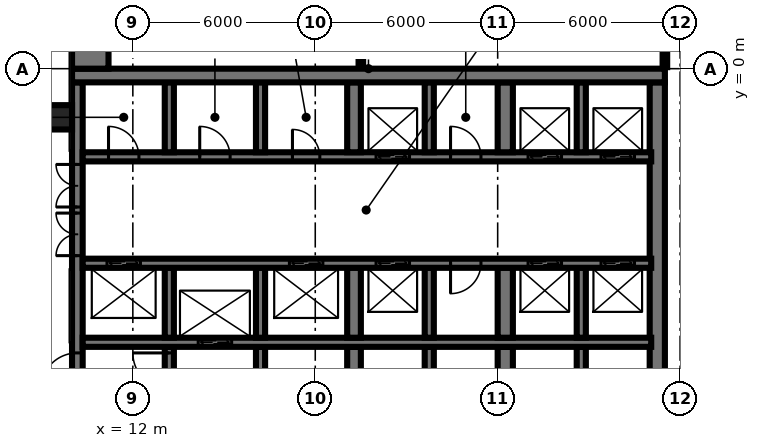
"""IFC4 building model, lengths in metres.
Left out: names, types, materials, properties, quantities, classifications, styles, units other than length and angle.
Written with IfcOpenShell. Run it as: python <this file> out.ifc"""

import sys

from ifc_helpers import new_model, si_unit, direction, frame, frame_2d, origin, origin_2d, place, context, subcontext, project, spatial, rectangle, extrude, element, fill, save


model = new_model("IFC4")
c1 = context("Model", 3, precision=1e-05, world=origin(), true_north=direction((0.0, 1.0)))
c2 = subcontext(c1, "Body", "Model", "MODEL_VIEW")
j1 = project(units=[si_unit("LENGTHUNIT", "METRE"), si_unit("PLANEANGLEUNIT", "RADIAN")], contexts=[c1])
p1 = place(None, origin())
s1 = spatial("IfcSite", under=j1, at=p1, CompositionType="ELEMENT")
p2 = place(p1, origin())
s2 = spatial("IfcBuilding", under=s1, at=p2, CompositionType="ELEMENT")
p3 = place(p2, origin())
s3 = spatial("IfcBuildingStorey", under=s2, at=p3, CompositionType="ELEMENT", Elevation=0.0)
p4 = place(p3, frame((10.0, -0.225, -0.3), z_axis=(0.0, 0.0, 1.0), x_axis=(1.0, 0.0, 0.0)))
e1 = element("IfcWall", 1, at=p4, inside=s3, PredefinedType="SHEAR", context=c2, shape_type="SweptSolid", body=[
    extrude(rectangle(XDim=19.5, YDim=0.45, at=frame_2d((9.75, 0.0))), origin(), (0.0, 0.0, 1.0), 7.3),
])
p5 = place(p3, frame((10.175, -14.55, -0.3), z_axis=(0.0, 0.0, 1.0), x_axis=(0.0, 1.0, 0.0)))
e2 = element("IfcWall", 2, at=p5, inside=s3, PredefinedType="SHEAR", context=c2, shape_type="SweptSolid", body=[
    extrude(rectangle(XDim=14.1, YDim=0.35, at=frame_2d((7.05, 0.0))), origin(), (0.0, 0.0, 1.0), 7.3),
])
p6 = place(p5, frame((8.4, 0.0, 0.3)))
e3 = element("IfcOpeningElement", 3, at=p6, cuts=e2, PredefinedType="OPENING", context=c2, shape_type="SweptSolid", body=[
    extrude(rectangle(XDim=1.4, YDim=2.4, at=frame_2d((0.7, 1.2))), frame((0.0, 0.185, 0.0), z_axis=(0.0, -1.0, 0.0), x_axis=(1.0, 0.0, 0.0)), (0.0, 0.0, 1.0), 0.37),
])
p7 = place(p5, frame((10.0, 0.0, 0.3)))
e4 = element("IfcOpeningElement", 4, at=p7, cuts=e2, PredefinedType="OPENING", context=c2, shape_type="SweptSolid", body=[
    extrude(rectangle(XDim=1.4, YDim=2.4, at=frame_2d((0.7, 1.2))), frame((0.0, 0.185, 0.0), z_axis=(0.0, -1.0, 0.0), x_axis=(1.0, 0.0, 0.0)), (0.0, 0.0, 1.0), 0.37),
])
p8 = place(p5, frame((4.0, 0.0, 0.3)))
e5 = element("IfcOpeningElement", 5, at=p8, cuts=e2, PredefinedType="OPENING", context=c2, shape_type="SweptSolid", body=[
    extrude(rectangle(XDim=1.2, YDim=2.1, at=frame_2d((0.6, 1.05))), frame((0.0, 0.185, 0.0), z_axis=(0.0, -1.0, 0.0), x_axis=(1.0, 0.0, 0.0)), (0.0, 0.0, 1.0), 0.37),
])
p9 = place(p3, frame((29.25, -14.55, -0.3), z_axis=(0.0, 0.0, 1.0), x_axis=(0.0, 1.0, 0.0)))
e6 = element("IfcWall", 6, at=p9, inside=s3, PredefinedType="SHEAR", context=c2, shape_type="SweptSolid", body=[
    extrude(rectangle(XDim=14.1, YDim=0.5, at=frame_2d((7.05, 0.0))), origin(), (0.0, 0.0, 1.0), 7.3),
])
p10 = place(p3, frame((10.35, -2.9, -0.3), z_axis=(0.0, 0.0, 1.0), x_axis=(1.0, 0.0, 0.0)))
e7 = element("IfcWall", 7, at=p10, inside=s3, PredefinedType="SHEAR", context=c2, shape_type="SweptSolid", body=[
    extrude(rectangle(XDim=18.7, YDim=0.3, at=frame_2d((9.35, 0.0))), origin(), (0.0, 0.0, 1.0), 7.3),
])
p11 = place(p10, frame((14.65, 0.0, 0.3)))
e8 = element("IfcOpeningElement", 8, at=p11, cuts=e7, PredefinedType="OPENING", context=c2, shape_type="SweptSolid", body=[
    extrude(rectangle(XDim=1.1, YDim=2.1, at=frame_2d((0.55, 1.05))), frame((0.0, 0.16, 0.0), z_axis=(0.0, -1.0, 0.0), x_axis=(1.0, 0.0, 0.0)), (0.0, 0.0, 1.0), 0.32),
])
p12 = place(p10, frame((17.05, 0.0, 0.3)))
e9 = element("IfcOpeningElement", 9, at=p12, cuts=e7, PredefinedType="OPENING", context=c2, shape_type="SweptSolid", body=[
    extrude(rectangle(XDim=1.1, YDim=2.1, at=frame_2d((0.55, 1.05))), frame((0.0, 0.16, 0.0), z_axis=(0.0, -1.0, 0.0), x_axis=(1.0, 0.0, 0.0)), (0.0, 0.0, 1.0), 0.32),
])
p13 = place(p10, frame((9.65, 0.0, 0.3)))
e10 = element("IfcOpeningElement", 10, at=p13, cuts=e7, PredefinedType="OPENING", context=c2, shape_type="SweptSolid", body=[
    extrude(rectangle(XDim=1.1, YDim=2.1, at=frame_2d((0.55, 1.05))), frame((0.0, 0.16, 0.0), z_axis=(0.0, -1.0, 0.0), x_axis=(1.0, 0.0, 0.0)), (0.0, 0.0, 1.0), 0.32),
])
p14 = place(p10, frame((6.9, 0.0, 0.3)))
e11 = element("IfcOpeningElement", 11, at=p14, cuts=e7, PredefinedType="OPENING", context=c2, shape_type="SweptSolid", body=[
    extrude(rectangle(XDim=0.9, YDim=2.1, at=frame_2d((0.45, 1.05))), frame((0.0, 0.16, 0.0), z_axis=(0.0, -1.0, 0.0), x_axis=(1.0, 0.0, 0.0)), (0.0, 0.0, 1.0), 0.32),
])
p15 = place(p10, frame((0.85, 0.0, 0.3)))
e12 = element("IfcOpeningElement", 12, at=p15, cuts=e7, PredefinedType="OPENING", context=c2, shape_type="SweptSolid", body=[
    extrude(rectangle(XDim=1.0, YDim=2.1, at=frame_2d((0.5, 1.05))), frame((0.0, 0.16, 0.0), z_axis=(0.0, -1.0, 0.0), x_axis=(1.0, 0.0, 0.0)), (0.0, 0.0, 1.0), 0.32),
])
p16 = place(p10, frame((3.85, 0.0, 0.3)))
e13 = element("IfcOpeningElement", 13, at=p16, cuts=e7, PredefinedType="OPENING", context=c2, shape_type="SweptSolid", body=[
    extrude(rectangle(XDim=1.0, YDim=2.1, at=frame_2d((0.5, 1.05))), frame((0.0, 0.16, 0.0), z_axis=(0.0, -1.0, 0.0), x_axis=(1.0, 0.0, 0.0)), (0.0, 0.0, 1.0), 0.32),
])
p17 = place(p10, frame((12.1, 0.0, 0.3)))
e14 = element("IfcOpeningElement", 14, at=p17, cuts=e7, PredefinedType="OPENING", context=c2, shape_type="SweptSolid", body=[
    extrude(rectangle(XDim=1.0, YDim=2.1, at=frame_2d((0.5, 1.05))), frame((0.0, 0.16, 0.0), z_axis=(0.0, -1.0, 0.0), x_axis=(1.0, 0.0, 0.0)), (0.0, 0.0, 1.0), 0.32),
])
p18 = place(p3, frame((10.35, -6.4, -0.3), z_axis=(0.0, 0.0, 1.0), x_axis=(1.0, 0.0, 0.0)))
e15 = element("IfcWall", 15, at=p18, inside=s3, PredefinedType="SHEAR", context=c2, shape_type="SweptSolid", body=[
    extrude(rectangle(XDim=18.7, YDim=0.3, at=frame_2d((9.35, 0.0))), origin(), (0.0, 0.0, 1.0), 7.3),
])
p19 = place(p18, frame((14.65, 0.0, 0.3)))
e16 = element("IfcOpeningElement", 16, at=p19, cuts=e15, PredefinedType="OPENING", context=c2, shape_type="SweptSolid", body=[
    extrude(rectangle(XDim=1.1, YDim=2.1, at=frame_2d((0.55, 1.05))), frame((0.0, 0.16, 0.0), z_axis=(0.0, -1.0, 0.0), x_axis=(1.0, 0.0, 0.0)), (0.0, 0.0, 1.0), 0.32),
])
p20 = place(p18, frame((17.05, 0.0, 0.3)))
e17 = element("IfcOpeningElement", 17, at=p20, cuts=e15, PredefinedType="OPENING", context=c2, shape_type="SweptSolid", body=[
    extrude(rectangle(XDim=1.1, YDim=2.1, at=frame_2d((0.55, 1.05))), frame((0.0, 0.16, 0.0), z_axis=(0.0, -1.0, 0.0), x_axis=(1.0, 0.0, 0.0)), (0.0, 0.0, 1.0), 0.32),
])
p21 = place(p18, frame((9.65, 0.0, 0.3)))
e18 = element("IfcOpeningElement", 18, at=p21, cuts=e15, PredefinedType="OPENING", context=c2, shape_type="SweptSolid", body=[
    extrude(rectangle(XDim=1.1, YDim=2.1, at=frame_2d((0.55, 1.05))), frame((0.0, 0.16, 0.0), z_axis=(0.0, -1.0, 0.0), x_axis=(1.0, 0.0, 0.0)), (0.0, 0.0, 1.0), 0.32),
])
p22 = place(p18, frame((0.8, 0.0, 0.3)))
e19 = element("IfcOpeningElement", 19, at=p22, cuts=e15, PredefinedType="OPENING", context=c2, shape_type="SweptSolid", body=[
    extrude(rectangle(XDim=1.1, YDim=2.1, at=frame_2d((0.55, 1.05))), frame((0.0, 0.16, 0.0), z_axis=(0.0, -1.0, 0.0), x_axis=(1.0, 0.0, 0.0)), (0.0, 0.0, 1.0), 0.32),
])
p23 = place(p18, frame((6.8, 0.0, 0.3)))
e20 = element("IfcOpeningElement", 20, at=p23, cuts=e15, PredefinedType="OPENING", context=c2, shape_type="SweptSolid", body=[
    extrude(rectangle(XDim=1.1, YDim=2.1, at=frame_2d((0.55, 1.05))), frame((0.0, 0.16, 0.0), z_axis=(0.0, -1.0, 0.0), x_axis=(1.0, 0.0, 0.0)), (0.0, 0.0, 1.0), 0.32),
])
p24 = place(p18, frame((12.1, 0.0, 0.3)))
e21 = element("IfcOpeningElement", 21, at=p24, cuts=e15, PredefinedType="OPENING", context=c2, shape_type="SweptSolid", body=[
    extrude(rectangle(XDim=1.0, YDim=2.1, at=frame_2d((0.5, 1.05))), frame((0.0, 0.16, 0.0), z_axis=(0.0, -1.0, 0.0), x_axis=(1.0, 0.0, 0.0)), (0.0, 0.0, 1.0), 0.32),
])
p25 = place(p3, frame((10.35, -9.0, -0.3), z_axis=(0.0, 0.0, 1.0), x_axis=(1.0, 0.0, 0.0)))
e22 = element("IfcWall", 22, at=p25, inside=s3, PredefinedType="SHEAR", context=c2, shape_type="SweptSolid", body=[
    extrude(rectangle(XDim=18.7, YDim=0.3, at=frame_2d((9.35, 0.0))), origin(), (0.0, 0.0, 1.0), 7.3),
])
p26 = place(p25, frame((3.8, 0.0, 0.3)))
e23 = element("IfcOpeningElement", 23, at=p26, cuts=e22, PredefinedType="OPENING", context=c2, shape_type="SweptSolid", body=[
    extrude(rectangle(XDim=1.1, YDim=2.1, at=frame_2d((0.55, 1.05))), frame((0.0, 0.16, 0.0), z_axis=(0.0, -1.0, 0.0), x_axis=(1.0, 0.0, 0.0)), (0.0, 0.0, 1.0), 0.32),
])
for number, where, z_axis, x_axis in (
    (24, (13.2, -2.75, -0.3), (0.0, 0.0, 1.0), (0.0, 1.0, 0.0)),
    (25, (13.2, -8.85, -0.3), (0.0, 0.0, 1.0), (0.0, 1.0, 0.0)),
):
    element("IfcWall", number, at=place(p3, frame(where, z_axis=z_axis, x_axis=x_axis)), inside=s3, PredefinedType="SHEAR", context=c2, shape_type="SweptSolid", body=[
        extrude(rectangle(XDim=2.3, YDim=0.3, at=frame_2d((1.15, 0.0))), origin(), (0.0, 0.0, 1.0), 7.3),
    ])
p27 = place(p3, frame((13.2, -14.55, -0.3), z_axis=(0.0, 0.0, 1.0), x_axis=(0.0, 1.0, 0.0)))
e26 = element("IfcWall", 26, at=p27, inside=s3, PredefinedType="SHEAR", context=c2, shape_type="SweptSolid", body=[
    extrude(rectangle(XDim=5.4, YDim=0.3, at=frame_2d((2.7, 0.0))), origin(), (0.0, 0.0, 1.0), 7.3),
])
p28 = place(p27, frame((4.0, 0.0, 0.3)))
e27 = element("IfcOpeningElement", 27, at=p28, cuts=e26, PredefinedType="OPENING", context=c2, shape_type="SweptSolid", body=[
    extrude(rectangle(XDim=1.2, YDim=2.1, at=frame_2d((0.6, 1.05))), frame((0.0, 0.16, 0.0), z_axis=(0.0, -1.0, 0.0), x_axis=(1.0, 0.0, 0.0)), (0.0, 0.0, 1.0), 0.32),
])
for number, where, z_axis, x_axis in (
    (28, (16.2, -2.75, -0.3), (0.0, 0.0, 1.0), (0.0, 1.0, 0.0)),
    (29, (16.2, -8.85, -0.3), (0.0, 0.0, 1.0), (0.0, 1.0, 0.0)),
):
    element("IfcWall", number, at=place(p3, frame(where, z_axis=z_axis, x_axis=x_axis)), inside=s3, PredefinedType="SHEAR", context=c2, shape_type="SweptSolid", body=[
        extrude(rectangle(XDim=2.3, YDim=0.3, at=frame_2d((1.15, 0.0))), origin(), (0.0, 0.0, 1.0), 7.3),
    ])
p29 = place(p3, frame((16.2, -14.55, -0.3), z_axis=(0.0, 0.0, 1.0), x_axis=(0.0, 1.0, 0.0)))
e30 = element("IfcWall", 30, at=p29, inside=s3, PredefinedType="SHEAR", context=c2, shape_type="SweptSolid", body=[
    extrude(rectangle(XDim=5.4, YDim=0.3, at=frame_2d((2.7, 0.0))), origin(), (0.0, 0.0, 1.0), 7.3),
])
p30 = place(p29, frame((0.2, 0.0, 0.3)))
e31 = element("IfcOpeningElement", 31, at=p30, cuts=e30, PredefinedType="OPENING", context=c2, shape_type="SweptSolid", body=[
    extrude(rectangle(XDim=1.2, YDim=2.1, at=frame_2d((0.6, 1.05))), frame((0.0, 0.16, 0.0), z_axis=(0.0, -1.0, 0.0), x_axis=(1.0, 0.0, 0.0)), (0.0, 0.0, 1.0), 0.32),
])
for number, where, z_axis, x_axis in (
    (32, (19.275, -2.75, -0.3), (0.0, 0.0, 1.0), (0.0, 1.0, 0.0)),
    (33, (19.275, -8.85, -0.3), (0.0, 0.0, 1.0), (0.0, 1.0, 0.0)),
):
    element("IfcWall", number, at=place(p3, frame(where, z_axis=z_axis, x_axis=x_axis)), inside=s3, PredefinedType="SHEAR", context=c2, shape_type="SweptSolid", body=[
        extrude(rectangle(XDim=2.3, YDim=0.45, at=frame_2d((1.15, 0.0))), origin(), (0.0, 0.0, 1.0), 7.3),
    ])
p31 = place(p3, frame((19.275, -14.55, -0.3), z_axis=(0.0, 0.0, 1.0), x_axis=(0.0, 1.0, 0.0)))
e34 = element("IfcWall", 34, at=p31, inside=s3, PredefinedType="SHEAR", context=c2, shape_type="SweptSolid", body=[
    extrude(rectangle(XDim=5.4, YDim=0.45, at=frame_2d((2.7, 0.0))), origin(), (0.0, 0.0, 1.0), 7.3),
])
for number, where, z_axis, x_axis in (
    (35, (21.75, -2.75, -0.3), (0.0, 0.0, 1.0), (0.0, 1.0, 0.0)),
    (36, (21.75, -8.85, -0.3), (0.0, 0.0, 1.0), (0.0, 1.0, 0.0)),
):
    element("IfcWall", number, at=place(p3, frame(where, z_axis=z_axis, x_axis=x_axis)), inside=s3, PredefinedType="SHEAR", context=c2, shape_type="SweptSolid", body=[
        extrude(rectangle(XDim=2.3, YDim=0.3, at=frame_2d((1.15, 0.0))), origin(), (0.0, 0.0, 1.0), 7.3),
    ])
p32 = place(p3, frame((21.75, -14.55, -0.3), z_axis=(0.0, 0.0, 1.0), x_axis=(0.0, 1.0, 0.0)))
e37 = element("IfcWall", 37, at=p32, inside=s3, PredefinedType="SHEAR", context=c2, shape_type="SweptSolid", body=[
    extrude(rectangle(XDim=5.4, YDim=0.3, at=frame_2d((2.7, 0.0))), origin(), (0.0, 0.0, 1.0), 7.3),
])
for number, where, z_axis, x_axis in (
    (38, (24.25, -2.75, -0.3), (0.0, 0.0, 1.0), (0.0, 1.0, 0.0)),
    (39, (24.25, -8.85, -0.3), (0.0, 0.0, 1.0), (0.0, 1.0, 0.0)),
):
    element("IfcWall", number, at=place(p3, frame(where, z_axis=z_axis, x_axis=x_axis)), inside=s3, PredefinedType="SHEAR", context=c2, shape_type="SweptSolid", body=[
        extrude(rectangle(XDim=2.3, YDim=0.5, at=frame_2d((1.15, 0.0))), origin(), (0.0, 0.0, 1.0), 7.3),
    ])
p33 = place(p3, frame((24.25, -14.55, -0.3), z_axis=(0.0, 0.0, 1.0), x_axis=(0.0, 1.0, 0.0)))
e40 = element("IfcWall", 40, at=p33, inside=s3, PredefinedType="SHEAR", context=c2, shape_type="SweptSolid", body=[
    extrude(rectangle(XDim=5.4, YDim=0.5, at=frame_2d((2.7, 0.0))), origin(), (0.0, 0.0, 1.0), 7.3),
])
for number, where, z_axis, x_axis in (
    (41, (26.75, -2.75, -0.3), (0.0, 0.0, 1.0), (0.0, 1.0, 0.0)),
    (42, (26.75, -8.85, -0.3), (0.0, 0.0, 1.0), (0.0, 1.0, 0.0)),
):
    element("IfcWall", number, at=place(p3, frame(where, z_axis=z_axis, x_axis=x_axis)), inside=s3, PredefinedType="SHEAR", context=c2, shape_type="SweptSolid", body=[
        extrude(rectangle(XDim=2.3, YDim=0.3, at=frame_2d((1.15, 0.0))), origin(), (0.0, 0.0, 1.0), 7.3),
    ])
p34 = place(p3, frame((26.75, -14.55, -0.3), z_axis=(0.0, 0.0, 1.0), x_axis=(0.0, 1.0, 0.0)))
e43 = element("IfcWall", 43, at=p34, inside=s3, PredefinedType="SHEAR", context=c2, shape_type="SweptSolid", body=[
    extrude(rectangle(XDim=5.4, YDim=0.3, at=frame_2d((2.7, 0.0))), origin(), (0.0, 0.0, 1.0), 7.3),
])
p35 = place(p3, frame((10.6, 0.0, -0.3), z_axis=(0.0, 0.0, 1.0), x_axis=(0.0, 1.0, 0.0)))
e44 = element("IfcWall", 44, at=p35, inside=s3, PredefinedType="SHEAR", context=c2, shape_type="SweptSolid", body=[
    extrude(rectangle(XDim=8.0, YDim=1.2, at=frame_2d((4.0, 0.0))), origin(), (0.0, 0.0, 1.0), 7.3),
])
p36 = place(p3, frame((9.6, -1.6, -0.3), z_axis=(0.0, 0.0, 1.0), x_axis=(1.0, 0.0, 0.0)))
e45 = element("IfcColumn", 45, at=p36, inside=s3, PredefinedType="COLUMN", context=c2, shape_type="SweptSolid", body=[
    extrude(rectangle(XDim=0.8, YDim=0.8, at=origin_2d()), origin(), (0.0, 0.0, 1.0), 7.3),
])
p37 = place(p3, frame((29.5, 0.05, 0.0), z_axis=(0.0, 0.0, 1.0), x_axis=(0.0, 1.0, 0.0)))
e46 = element("IfcWall", 46, at=p37, inside=s3, PredefinedType="PARTITIONING", context=c2, shape_type="SweptSolid", body=[
    extrude(rectangle(XDim=7.77, YDim=0.15, at=frame_2d((3.885, 0.0))), origin(), (0.0, 0.0, 1.0), 6.55),
])
p38 = place(p37, frame((3.5, 0.0, 0.0)))
e47 = element("IfcOpeningElement", 47, at=p38, cuts=e46, PredefinedType="OPENING", context=c2, shape_type="SweptSolid", body=[
    extrude(rectangle(XDim=0.9, YDim=2.1, at=frame_2d((0.45, 1.05))), frame((0.0, 0.085, 0.0), z_axis=(0.0, -1.0, 0.0), x_axis=(1.0, 0.0, 0.0)), (0.0, 0.0, 1.0), 0.17),
])
p39 = place(p3, frame((19.5, 0.05, 0.0), z_axis=(0.0, 0.0, 1.0), x_axis=(0.0, 1.0, 0.0)))
e48 = element("IfcWall", 48, at=p39, inside=s3, PredefinedType="PARTITIONING", context=c2, shape_type="SweptSolid", body=[
    extrude(rectangle(XDim=7.77, YDim=0.15, at=frame_2d((3.885, 0.0))), origin(), (0.0, 0.0, 1.0), 6.55),
])
p40 = place(p39, frame((3.5, 0.0, 0.0)))
e49 = element("IfcOpeningElement", 49, at=p40, cuts=e48, PredefinedType="OPENING", context=c2, shape_type="SweptSolid", body=[
    extrude(rectangle(XDim=0.9, YDim=2.1, at=frame_2d((0.45, 1.05))), frame((0.0, 0.085, 0.0), z_axis=(0.0, -1.0, 0.0), x_axis=(1.0, 0.0, 0.0)), (0.0, 0.0, 1.0), 0.17),
])
p41 = place(p11, origin())
e50 = element("IfcDoor", 50, at=p41, inside=s3, OperationType="DOUBLE_DOOR_SLIDING", PredefinedType="USERDEFINED", context=c2, shape_type="SweptSolid", body=[
    extrude(rectangle(XDim=1.1, YDim=2.1, at=frame_2d((0.55, 1.05))), frame((0.0, 0.025, 0.0), z_axis=(0.0, -1.0, 0.0), x_axis=(1.0, 0.0, 0.0)), (0.0, 0.0, 1.0), 0.05),
])
fill(e8, e50)
p42 = place(p12, origin())
e51 = element("IfcDoor", 51, at=p42, inside=s3, OperationType="DOUBLE_DOOR_SLIDING", PredefinedType="USERDEFINED", context=c2, shape_type="SweptSolid", body=[
    extrude(rectangle(XDim=1.1, YDim=2.1, at=frame_2d((0.55, 1.05))), frame((0.0, 0.025, 0.0), z_axis=(0.0, -1.0, 0.0), x_axis=(1.0, 0.0, 0.0)), (0.0, 0.0, 1.0), 0.05),
])
fill(e9, e51)
p43 = place(p19, origin())
e52 = element("IfcDoor", 52, at=p43, inside=s3, OperationType="DOUBLE_DOOR_SLIDING", PredefinedType="USERDEFINED", context=c2, shape_type="SweptSolid", body=[
    extrude(rectangle(XDim=1.1, YDim=2.1, at=frame_2d((0.55, 1.05))), frame((0.0, 0.025, 0.0), z_axis=(0.0, -1.0, 0.0), x_axis=(1.0, 0.0, 0.0)), (0.0, 0.0, 1.0), 0.05),
])
fill(e16, e52)
p44 = place(p20, origin())
e53 = element("IfcDoor", 53, at=p44, inside=s3, OperationType="DOUBLE_DOOR_SLIDING", PredefinedType="USERDEFINED", context=c2, shape_type="SweptSolid", body=[
    extrude(rectangle(XDim=1.1, YDim=2.1, at=frame_2d((0.55, 1.05))), frame((0.0, 0.025, 0.0), z_axis=(0.0, -1.0, 0.0), x_axis=(1.0, 0.0, 0.0)), (0.0, 0.0, 1.0), 0.05),
])
fill(e17, e53)
p45 = place(p13, origin())
e54 = element("IfcDoor", 54, at=p45, inside=s3, OperationType="DOUBLE_DOOR_SLIDING", PredefinedType="USERDEFINED", context=c2, shape_type="SweptSolid", body=[
    extrude(rectangle(XDim=1.1, YDim=2.1, at=frame_2d((0.55, 1.05))), frame((0.0, 0.025, 0.0), z_axis=(0.0, -1.0, 0.0), x_axis=(1.0, 0.0, 0.0)), (0.0, 0.0, 1.0), 0.05),
])
fill(e10, e54)
p46 = place(p21, origin())
e55 = element("IfcDoor", 55, at=p46, inside=s3, OperationType="DOUBLE_DOOR_SLIDING", PredefinedType="USERDEFINED", context=c2, shape_type="SweptSolid", body=[
    extrude(rectangle(XDim=1.1, YDim=2.1, at=frame_2d((0.55, 1.05))), frame((0.0, 0.025, 0.0), z_axis=(0.0, -1.0, 0.0), x_axis=(1.0, 0.0, 0.0)), (0.0, 0.0, 1.0), 0.05),
])
fill(e18, e55)
p47 = place(p22, origin())
e56 = element("IfcDoor", 56, at=p47, inside=s3, OperationType="DOUBLE_DOOR_SLIDING", PredefinedType="USERDEFINED", context=c2, shape_type="SweptSolid", body=[
    extrude(rectangle(XDim=1.1, YDim=2.1, at=frame_2d((0.55, 1.05))), frame((0.0, 0.025, 0.0), z_axis=(0.0, -1.0, 0.0), x_axis=(1.0, 0.0, 0.0)), (0.0, 0.0, 1.0), 0.05),
])
fill(e19, e56)
p48 = place(p26, origin())
e57 = element("IfcDoor", 57, at=p48, inside=s3, OperationType="DOUBLE_DOOR_SLIDING", PredefinedType="USERDEFINED", context=c2, shape_type="SweptSolid", body=[
    extrude(rectangle(XDim=1.1, YDim=2.1, at=frame_2d((0.55, 1.05))), frame((0.0, 0.025, 0.0), z_axis=(0.0, -1.0, 0.0), x_axis=(1.0, 0.0, 0.0)), (0.0, 0.0, 1.0), 0.05),
])
fill(e23, e57)
p49 = place(p23, origin())
e58 = element("IfcDoor", 58, at=p49, inside=s3, OperationType="DOUBLE_DOOR_SLIDING", PredefinedType="USERDEFINED", context=c2, shape_type="SweptSolid", body=[
    extrude(rectangle(XDim=1.1, YDim=2.1, at=frame_2d((0.55, 1.05))), frame((0.0, 0.025, 0.0), z_axis=(0.0, -1.0, 0.0), x_axis=(1.0, 0.0, 0.0)), (0.0, 0.0, 1.0), 0.05),
])
fill(e20, e58)
p50 = place(p6, origin())
e59 = element("IfcDoor", 59, at=p50, inside=s3, OperationType="DOUBLE_DOOR_SINGLE_SWING", PredefinedType="DOOR", context=c2, shape_type="SweptSolid", body=[
    extrude(rectangle(XDim=1.4, YDim=2.4, at=frame_2d((0.7, 1.2))), frame((0.0, 0.025, 0.0), z_axis=(0.0, -1.0, 0.0), x_axis=(1.0, 0.0, 0.0)), (0.0, 0.0, 1.0), 0.05),
])
fill(e3, e59)
p51 = place(p7, origin())
e60 = element("IfcDoor", 60, at=p51, inside=s3, OperationType="DOUBLE_DOOR_SINGLE_SWING", PredefinedType="DOOR", context=c2, shape_type="SweptSolid", body=[
    extrude(rectangle(XDim=1.4, YDim=2.4, at=frame_2d((0.7, 1.2))), frame((0.0, 0.025, 0.0), z_axis=(0.0, -1.0, 0.0), x_axis=(1.0, 0.0, 0.0)), (0.0, 0.0, 1.0), 0.05),
])
fill(e4, e60)
p52 = place(p8, origin())
e61 = element("IfcDoor", 61, at=p52, inside=s3, OperationType="SINGLE_SWING_RIGHT", PredefinedType="DOOR", context=c2, shape_type="SweptSolid", body=[
    extrude(rectangle(XDim=1.2, YDim=2.1, at=frame_2d((0.6, 1.05))), frame((0.0, 0.025, 0.0), z_axis=(0.0, -1.0, 0.0), x_axis=(1.0, 0.0, 0.0)), (0.0, 0.0, 1.0), 0.05),
])
fill(e5, e61)
p53 = place(p14, origin())
e62 = element("IfcDoor", 62, at=p53, inside=s3, OperationType="SINGLE_SWING_RIGHT", PredefinedType="DOOR", context=c2, shape_type="SweptSolid", body=[
    extrude(rectangle(XDim=0.9, YDim=2.1, at=frame_2d((0.45, 1.05))), frame((0.0, 0.025, 0.0), z_axis=(0.0, -1.0, 0.0), x_axis=(1.0, 0.0, 0.0)), (0.0, 0.0, 1.0), 0.05),
])
fill(e11, e62)
p54 = place(p15, origin())
e63 = element("IfcDoor", 63, at=p54, inside=s3, OperationType="SINGLE_SWING_RIGHT", PredefinedType="DOOR", context=c2, shape_type="SweptSolid", body=[
    extrude(rectangle(XDim=1.0, YDim=2.1, at=frame_2d((0.5, 1.05))), frame((0.0, 0.025, 0.0), z_axis=(0.0, -1.0, 0.0), x_axis=(1.0, 0.0, 0.0)), (0.0, 0.0, 1.0), 0.05),
])
fill(e12, e63)
p55 = place(p16, origin())
e64 = element("IfcDoor", 64, at=p55, inside=s3, OperationType="SINGLE_SWING_RIGHT", PredefinedType="DOOR", context=c2, shape_type="SweptSolid", body=[
    extrude(rectangle(XDim=1.0, YDim=2.1, at=frame_2d((0.5, 1.05))), frame((0.0, 0.025, 0.0), z_axis=(0.0, -1.0, 0.0), x_axis=(1.0, 0.0, 0.0)), (0.0, 0.0, 1.0), 0.05),
])
fill(e13, e64)
p56 = place(p17, origin())
e65 = element("IfcDoor", 65, at=p56, inside=s3, OperationType="SINGLE_SWING_RIGHT", PredefinedType="DOOR", context=c2, shape_type="SweptSolid", body=[
    extrude(rectangle(XDim=1.0, YDim=2.1, at=frame_2d((0.5, 1.05))), frame((0.0, 0.025, 0.0), z_axis=(0.0, -1.0, 0.0), x_axis=(1.0, 0.0, 0.0)), (0.0, 0.0, 1.0), 0.05),
])
fill(e14, e65)
p57 = place(p24, frame((0.5, 0.0, 0.0), z_axis=(0.0, 0.0, 1.0), x_axis=(-1.0, 0.0, 0.0)))
e66 = element("IfcDoor", 66, at=p57, inside=s3, OperationType="SINGLE_SWING_LEFT", PredefinedType="DOOR", context=c2, shape_type="SweptSolid", body=[
    extrude(rectangle(XDim=1.0, YDim=2.1, at=frame_2d((0.0, 1.05))), frame((0.0, -0.025, 0.0), z_axis=(0.0, 1.0, 0.0), x_axis=(-1.0, 0.0, 0.0)), (0.0, 0.0, 1.0), 0.05),
])
fill(e21, e66)
p58 = place(p28, origin())
e67 = element("IfcDoor", 67, at=p58, inside=s3, OperationType="SINGLE_SWING_LEFT", PredefinedType="DOOR", context=c2, shape_type="SweptSolid", body=[
    extrude(rectangle(XDim=1.2, YDim=2.1, at=frame_2d((0.6, 1.05))), frame((0.0, 0.025, 0.0), z_axis=(0.0, -1.0, 0.0), x_axis=(1.0, 0.0, 0.0)), (0.0, 0.0, 1.0), 0.05),
])
fill(e27, e67)
save(model, sys.argv[1])
